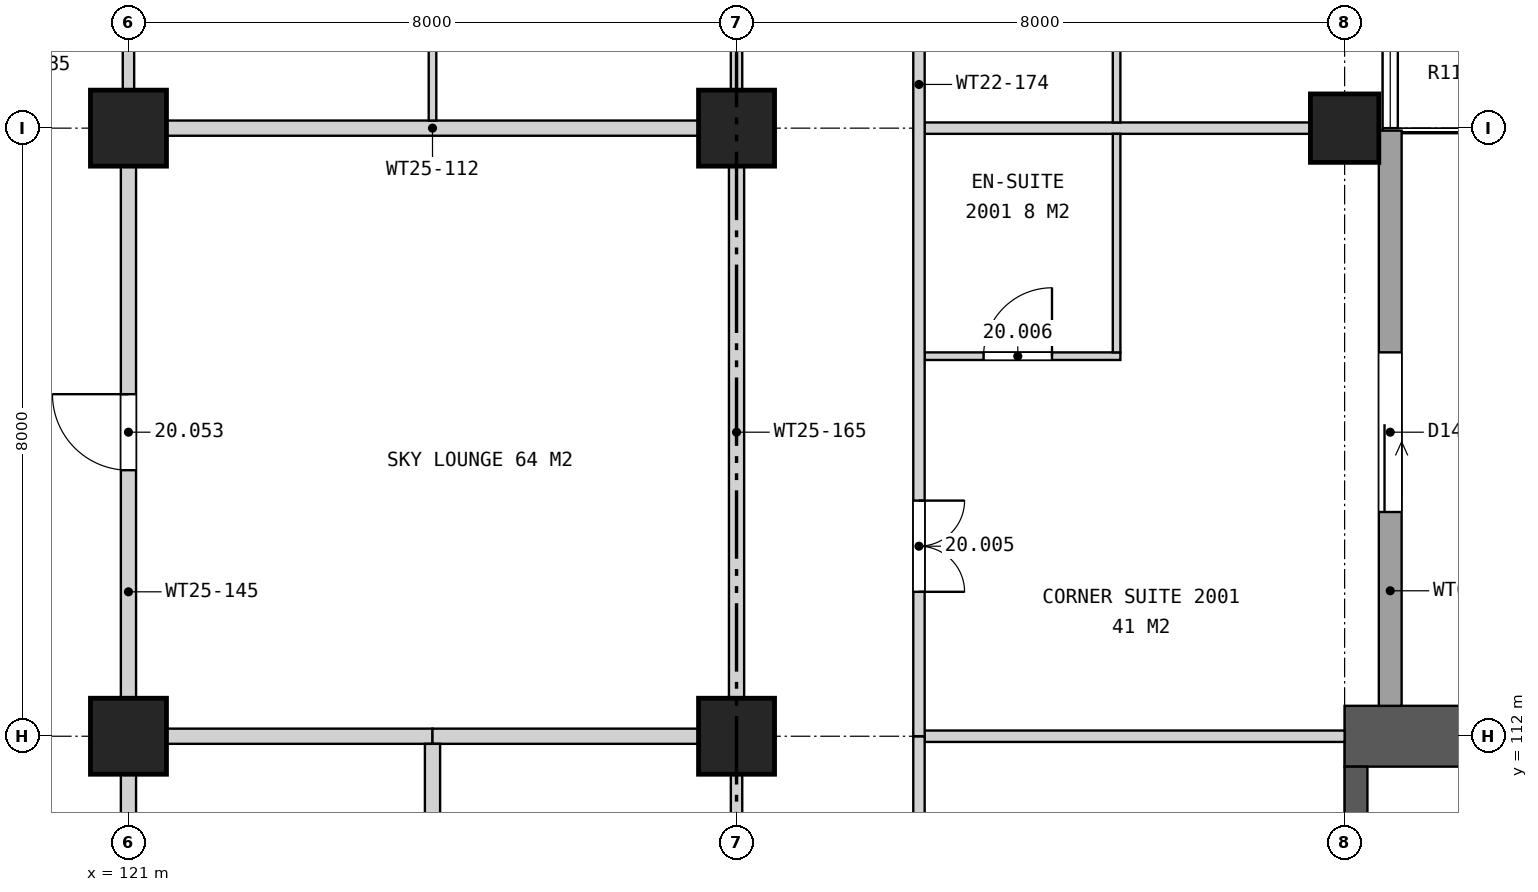
"""IFC4 building model, lengths in metres.
Left out: names, types, materials, properties, quantities, classifications, styles, units other than length and angle.
Written with IfcOpenShell. Run it as: python <this file> out.ifc"""

import sys

from ifc_helpers import new_model, si_unit, direction, frame, frame_2d, origin, origin_2d, place, context, subcontext, project, spatial, rectangle, extrude, element, fill, save


model = new_model("IFC4")
c1 = context("Model", 3, precision=1e-05, world=origin(), true_north=direction((0.0, 1.0)))
c2 = subcontext(c1, "Body", "Model", "MODEL_VIEW")
j1 = project(units=[si_unit("LENGTHUNIT", "METRE"), si_unit("PLANEANGLEUNIT", "RADIAN")], contexts=[c1])
p1 = place(None, origin())
s1 = spatial("IfcSite", under=j1, at=p1, CompositionType="ELEMENT")
p2 = place(p1, origin())
s2 = spatial("IfcBuilding", under=s1, at=p2, CompositionType="ELEMENT")
p3 = place(p2, frame((0.0, 0.0, 101.6)))
s3 = spatial("IfcBuildingStorey", under=s2, at=p3, CompositionType="ELEMENT", Elevation=101.6)
for number, where, z_axis, x_axis in (
    (1, (121.0, 112.0, 0.0), (0.0, 0.0, 1.0), (1.0, 0.0, 0.0)),
    (2, (121.0, 120.0, 0.0), (0.0, 0.0, 1.0), (1.0, 0.0, 0.0)),
    (3, (129.0, 112.0, 0.0), (0.0, 0.0, 1.0), (1.0, 0.0, 0.0)),
    (4, (129.0, 120.0, 0.0), (0.0, 0.0, 1.0), (1.0, 0.0, 0.0)),
):
    element("IfcColumn", number, at=place(p3, frame(where, z_axis=z_axis, x_axis=x_axis)), inside=s3, PredefinedType="COLUMN", context=c2, shape_type="SweptSolid", body=[
        extrude(rectangle(XDim=1.0, YDim=1.0, at=origin_2d()), origin(), (0.0, 0.0, 1.0), 3.7),
    ])
p4 = place(p3, frame((137.0, 120.0, 0.0), z_axis=(0.0, 0.0, 1.0), x_axis=(1.0, 0.0, 0.0)))
e5 = element("IfcColumn", 5, at=p4, inside=s3, PredefinedType="COLUMN", context=c2, shape_type="SweptSolid", body=[
    extrude(rectangle(XDim=0.9, YDim=0.9, at=origin_2d()), origin(), (0.0, 0.0, 1.0), 3.7),
])
p5 = place(p3, frame((137.0, 112.0, 0.0), z_axis=(0.0, 0.0, 1.0), x_axis=(1.0, 0.0, 0.0)))
e6 = element("IfcWall", 6, at=p5, inside=s3, PredefinedType="SHEAR", context=c2, shape_type="SweptSolid", body=[
    extrude(rectangle(XDim=7.1, YDim=0.8, at=frame_2d((3.55, 0.0))), origin(), (0.0, 0.0, 1.0), 3.7),
])
p6 = place(p3, frame((137.15, 105.7, 0.0), z_axis=(0.0, 0.0, 1.0), x_axis=(0.0, 1.0, 0.0)))
e7 = element("IfcWall", 7, at=p6, inside=s3, PredefinedType="SHEAR", context=c2, shape_type="SweptSolid", body=[
    extrude(rectangle(XDim=5.9, YDim=0.3, at=frame_2d((2.95, 0.0))), origin(), (0.0, 0.0, 1.0), 3.7),
])
p7 = place(p3, frame((137.6, 112.4, 0.0), z_axis=(0.0, 0.0, 1.0), x_axis=(0.0, 1.0, 0.0)))
e8 = element("IfcWall", 8, at=p7, inside=s3, PredefinedType="SOLIDWALL", context=c2, shape_type="SweptSolid", body=[
    extrude(rectangle(XDim=7.568, YDim=0.3, at=frame_2d((3.784, 0.0))), origin(), (0.0, 0.0, 1.0), 3.3),
])
p8 = place(p7, frame((2.55, 0.0, 0.0)))
e9 = element("IfcOpeningElement", 9, at=p8, cuts=e8, PredefinedType="OPENING", context=c2, shape_type="SweptSolid", body=[
    extrude(rectangle(XDim=2.1, YDim=2.4, at=frame_2d((1.05, 1.2))), frame((0.0, 0.16, 0.0), z_axis=(0.0, -1.0, 0.0), x_axis=(1.0, 0.0, 0.0)), (0.0, 0.0, 1.0), 0.32),
])
p9 = place(p3, frame((121.5, 112.0, 0.0), z_axis=(0.0, 0.0, 1.0), x_axis=(1.0, 0.0, 0.0)))
e10 = element("IfcWall", 10, at=p9, inside=s3, PredefinedType="SOLIDWALL", context=c2, shape_type="SweptSolid", body=[
    extrude(rectangle(XDim=3.5, YDim=0.2, at=frame_2d((1.75, 0.0))), origin(), (0.0, 0.0, 1.0), 3.7),
])
p10 = place(p3, frame((125.0, 112.0, 0.0), z_axis=(0.0, 0.0, 1.0), x_axis=(1.0, 0.0, 0.0)))
e11 = element("IfcWall", 11, at=p10, inside=s3, PredefinedType="PARTITIONING", context=c2, shape_type="SweptSolid", body=[
    extrude(rectangle(XDim=3.5, YDim=0.2, at=frame_2d((1.75, 0.0))), origin(), (0.0, 0.0, 1.0), 3.7),
])
p11 = place(p3, frame((131.475, 112.0, 0.0), z_axis=(0.0, 0.0, 1.0), x_axis=(1.0, 0.0, 0.0)))
e12 = element("IfcWall", 12, at=p11, inside=s3, PredefinedType="PARTITIONING", context=c2, shape_type="SweptSolid", body=[
    extrude(rectangle(XDim=5.525, YDim=0.15, at=frame_2d((2.762, 0.0))), origin(), (0.0, 0.0, 1.0), 3.7),
])
p12 = place(p3, frame((131.475, 117.0, 0.0), z_axis=(0.0, 0.0, 1.0), x_axis=(1.0, 0.0, 0.0)))
e13 = element("IfcWall", 13, at=p12, inside=s3, PredefinedType="PLUMBINGWALL", context=c2, shape_type="SweptSolid", body=[
    extrude(rectangle(XDim=2.575, YDim=0.1, at=frame_2d((1.288, 0.0))), origin(), (0.0, 0.0, 1.0), 3.7),
])
p13 = place(p12, frame((0.775, 0.0, 0.0)))
e14 = element("IfcOpeningElement", 14, at=p13, cuts=e13, PredefinedType="OPENING", context=c2, shape_type="SweptSolid", body=[
    extrude(rectangle(XDim=0.9, YDim=2.1, at=frame_2d((0.45, 1.05))), frame((0.0, 0.06, 0.0), z_axis=(0.0, -1.0, 0.0), x_axis=(1.0, 0.0, 0.0)), (0.0, 0.0, 1.0), 0.12),
])
p14 = place(p3, frame((121.5, 120.0, 0.0), z_axis=(0.0, 0.0, 1.0), x_axis=(1.0, 0.0, 0.0)))
e15 = element("IfcWall", 15, at=p14, inside=s3, PredefinedType="PARTITIONING", context=c2, shape_type="SweptSolid", body=[
    extrude(rectangle(XDim=7.0, YDim=0.2, at=frame_2d((3.5, 0.0))), origin(), (0.0, 0.0, 1.0), 2.76),
])
p15 = place(p3, frame((131.475, 120.0, 0.0), z_axis=(0.0, 0.0, 1.0), x_axis=(1.0, 0.0, 0.0)))
e16 = element("IfcWall", 16, at=p15, inside=s3, PredefinedType="PARTITIONING", context=c2, shape_type="SweptSolid", body=[
    extrude(rectangle(XDim=5.075, YDim=0.15, at=frame_2d((2.538, 0.0))), origin(), (0.0, 0.0, 1.0), 2.76),
])
p16 = place(p3, frame((121.0, 108.0, 0.0), z_axis=(0.0, 0.0, 1.0), x_axis=(0.0, 1.0, 0.0)))
e17 = element("IfcWall", 17, at=p16, inside=s3, PredefinedType="SOLIDWALL", context=c2, shape_type="SweptSolid", body=[
    extrude(rectangle(XDim=3.5, YDim=0.2, at=frame_2d((1.75, 0.0))), origin(), (0.0, 0.0, 1.0), 2.76),
])
p17 = place(p16, frame((1.5, 0.0, 0.0)))
e18 = element("IfcOpeningElement", 18, at=p17, cuts=e17, PredefinedType="OPENING", context=c2, shape_type="SweptSolid", body=[
    extrude(rectangle(XDim=1.0, YDim=2.2, at=frame_2d((0.5, 1.1))), frame((0.0, 0.11, 0.0), z_axis=(0.0, -1.0, 0.0), x_axis=(1.0, 0.0, 0.0)), (0.0, 0.0, 1.0), 0.22),
])
p18 = place(p3, frame((121.0, 112.5, 0.0), z_axis=(0.0, 0.0, 1.0), x_axis=(0.0, 1.0, 0.0)))
e19 = element("IfcWall", 19, at=p18, inside=s3, PredefinedType="PARTITIONING", context=c2, shape_type="SweptSolid", body=[
    extrude(rectangle(XDim=7.0, YDim=0.2, at=frame_2d((3.5, 0.0))), origin(), (0.0, 0.0, 1.0), 2.76),
])
p19 = place(p18, frame((3.0, 0.0, 0.0)))
e20 = element("IfcOpeningElement", 20, at=p19, cuts=e19, PredefinedType="OPENING", context=c2, shape_type="SweptSolid", body=[
    extrude(rectangle(XDim=1.0, YDim=2.1, at=frame_2d((0.5, 1.05))), frame((0.0, 0.11, 0.0), z_axis=(0.0, -1.0, 0.0), x_axis=(1.0, 0.0, 0.0)), (0.0, 0.0, 1.0), 0.22),
])
p20 = place(p3, frame((121.0, 120.5, 0.0), z_axis=(0.0, 0.0, 1.0), x_axis=(0.0, 1.0, 0.0)))
e21 = element("IfcWall", 21, at=p20, inside=s3, PredefinedType="PARTITIONING", context=c2, shape_type="SweptSolid", body=[
    extrude(rectangle(XDim=7.05, YDim=0.15, at=frame_2d((3.525, 0.0))), origin(), (0.0, 0.0, 1.0), 2.76),
])
p21 = place(p20, frame((3.0, 0.0, 0.0)))
e22 = element("IfcOpeningElement", 22, at=p21, cuts=e21, PredefinedType="OPENING", context=c2, shape_type="SweptSolid", body=[
    extrude(rectangle(XDim=1.0, YDim=2.1, at=frame_2d((0.5, 1.05))), frame((0.0, 0.085, 0.0), z_axis=(0.0, -1.0, 0.0), x_axis=(1.0, 0.0, 0.0)), (0.0, 0.0, 1.0), 0.17),
])
p22 = place(p3, frame((125.0, 108.05, 0.0), z_axis=(0.0, 0.0, 1.0), x_axis=(0.0, 1.0, 0.0)))
e23 = element("IfcWall", 23, at=p22, inside=s3, PredefinedType="SOLIDWALL", context=c2, shape_type="SweptSolid", body=[
    extrude(rectangle(XDim=3.85, YDim=0.2, at=frame_2d((1.925, 0.0))), origin(), (0.0, 0.0, 1.0), 2.843),
])
p23 = place(p3, frame((125.0, 120.1, 0.0), z_axis=(0.0, 0.0, 1.0), x_axis=(0.0, 1.0, 0.0)))
e24 = element("IfcWall", 24, at=p23, inside=s3, PredefinedType="PARTITIONING", context=c2, shape_type="SweptSolid", body=[
    extrude(rectangle(XDim=7.85, YDim=0.1, at=frame_2d((3.925, 0.0))), origin(), (0.0, 0.0, 1.0), 2.76),
])
p24 = place(p3, frame((129.0, 104.5, 0.0), z_axis=(0.0, 0.0, 1.0), x_axis=(0.0, 1.0, 0.0)))
e25 = element("IfcWall", 25, at=p24, inside=s3, PredefinedType="PARTITIONING", context=c2, shape_type="SweptSolid", body=[
    extrude(rectangle(XDim=7.0, YDim=0.15, at=frame_2d((3.5, 0.0))), origin(), (0.0, 0.0, 1.0), 2.76),
])
p25 = place(p24, frame((1.0, 0.0, 0.0)))
e26 = element("IfcOpeningElement", 26, at=p25, cuts=e25, PredefinedType="OPENING", context=c2, shape_type="SweptSolid", body=[
    extrude(rectangle(XDim=1.0, YDim=2.1, at=frame_2d((0.5, 1.05))), frame((0.0, 0.085, 0.0), z_axis=(0.0, -1.0, 0.0), x_axis=(1.0, 0.0, 0.0)), (0.0, 0.0, 1.0), 0.17),
])
p26 = place(p24, frame((5.0, 0.0, 0.0)))
e27 = element("IfcOpeningElement", 27, at=p26, cuts=e25, PredefinedType="OPENING", context=c2, shape_type="SweptSolid", body=[
    extrude(rectangle(XDim=1.0, YDim=2.1, at=frame_2d((0.5, 1.05))), frame((0.0, 0.085, 0.0), z_axis=(0.0, -1.0, 0.0), x_axis=(1.0, 0.0, 0.0)), (0.0, 0.0, 1.0), 0.17),
])
p27 = place(p3, frame((129.0, 112.5, 0.0), z_axis=(0.0, 0.0, 1.0), x_axis=(0.0, 1.0, 0.0)))
e28 = element("IfcWall", 28, at=p27, inside=s3, PredefinedType="PARTITIONING", context=c2, shape_type="SweptSolid", body=[
    extrude(rectangle(XDim=7.0, YDim=0.2, at=frame_2d((3.5, 0.0))), origin(), (0.0, 0.0, 1.0), 2.76),
])
p28 = place(p3, frame((129.0, 120.5, 0.0), z_axis=(0.0, 0.0, 1.0), x_axis=(0.0, 1.0, 0.0)))
e29 = element("IfcWall", 29, at=p28, inside=s3, PredefinedType="PARTITIONING", context=c2, shape_type="SweptSolid", body=[
    extrude(rectangle(XDim=7.05, YDim=0.15, at=frame_2d((3.525, 0.0))), origin(), (0.0, 0.0, 1.0), 2.76),
])
p29 = place(p28, frame((3.0, 0.0, 0.0)))
e30 = element("IfcOpeningElement", 30, at=p29, cuts=e29, PredefinedType="OPENING", context=c2, shape_type="SweptSolid", body=[
    extrude(rectangle(XDim=1.0, YDim=2.1, at=frame_2d((0.5, 1.05))), frame((0.0, 0.085, 0.0), z_axis=(0.0, -1.0, 0.0), x_axis=(1.0, 0.0, 0.0)), (0.0, 0.0, 1.0), 0.17),
])
p30 = place(p3, frame((131.4, 105.775, 0.0), z_axis=(0.0, 0.0, 1.0), x_axis=(0.0, 1.0, 0.0)))
e31 = element("IfcWall", 31, at=p30, inside=s3, PredefinedType="PARTITIONING", context=c2, shape_type="SweptSolid", body=[
    extrude(rectangle(XDim=6.225, YDim=0.15, at=frame_2d((3.113, 0.0))), origin(), (0.0, 0.0, 1.0), 2.843),
])
p31 = place(p30, frame((2.575, 0.0, 0.0)))
e32 = element("IfcOpeningElement", 32, at=p31, cuts=e31, PredefinedType="OPENING", context=c2, shape_type="SweptSolid", body=[
    extrude(rectangle(XDim=1.0, YDim=2.1, at=frame_2d((0.5, 1.05))), frame((0.0, 0.085, 0.0), z_axis=(0.0, -1.0, 0.0), x_axis=(1.0, 0.0, 0.0)), (0.0, 0.0, 1.0), 0.17),
])
p32 = place(p3, frame((131.4, 112.0, 0.0), z_axis=(0.0, 0.0, 1.0), x_axis=(0.0, 1.0, 0.0)))
e33 = element("IfcWall", 33, at=p32, inside=s3, PredefinedType="PARTITIONING", context=c2, shape_type="SweptSolid", body=[
    extrude(rectangle(XDim=24.5, YDim=0.15, at=frame_2d((12.25, 0.0))), origin(), (0.0, 0.0, 1.0), 2.76),
])
p33 = place(p32, frame((1.9, 0.0, 0.0)))
e34 = element("IfcOpeningElement", 34, at=p33, cuts=e33, PredefinedType="OPENING", context=c2, shape_type="SweptSolid", body=[
    extrude(rectangle(XDim=1.2, YDim=2.2, at=frame_2d((0.6, 1.1))), frame((0.0, 0.085, 0.0), z_axis=(0.0, -1.0, 0.0), x_axis=(1.0, 0.0, 0.0)), (0.0, 0.0, 1.0), 0.17),
])
p34 = place(p32, frame((12.9, 0.0, 0.0)))
e35 = element("IfcOpeningElement", 35, at=p34, cuts=e33, PredefinedType="OPENING", context=c2, shape_type="SweptSolid", body=[
    extrude(rectangle(XDim=1.2, YDim=2.2, at=frame_2d((0.6, 1.1))), frame((0.0, 0.085, 0.0), z_axis=(0.0, -1.0, 0.0), x_axis=(1.0, 0.0, 0.0)), (0.0, 0.0, 1.0), 0.17),
])
p35 = place(p32, frame((17.9, 0.0, 0.0)))
e36 = element("IfcOpeningElement", 36, at=p35, cuts=e33, PredefinedType="OPENING", context=c2, shape_type="SweptSolid", body=[
    extrude(rectangle(XDim=1.2, YDim=2.2, at=frame_2d((0.6, 1.1))), frame((0.0, 0.085, 0.0), z_axis=(0.0, -1.0, 0.0), x_axis=(1.0, 0.0, 0.0)), (0.0, 0.0, 1.0), 0.17),
])
for number, where, z_axis, x_axis in (
    (37, (134.0, 117.05, 0.0), (0.0, 0.0, 1.0), (0.0, 1.0, 0.0)),
    (38, (134.0, 120.075, 0.0), (0.0, 0.0, 1.0), (0.0, 1.0, 0.0)),
):
    element("IfcWall", number, at=place(p3, frame(where, z_axis=z_axis, x_axis=x_axis)), inside=s3, PredefinedType="PLUMBINGWALL", context=c2, shape_type="SweptSolid", body=[
        extrude(rectangle(XDim=2.875, YDim=0.1, at=frame_2d((1.438, 0.0))), origin(), (0.0, 0.0, 1.0), 3.7),
    ])
p36 = place(p8, frame((2.1, 0.0, 0.0), z_axis=(0.0, 0.0, 1.0), x_axis=(-1.0, 0.0, 0.0)))
e39 = element("IfcDoor", 39, at=p36, inside=s3, OperationType="SLIDING_TO_LEFT", PredefinedType="DOOR", context=c2, shape_type="SweptSolid", body=[
    extrude(rectangle(XDim=2.1, YDim=2.4, at=frame_2d((1.05, 1.2))), frame((0.0, 0.025, 0.0), z_axis=(0.0, -1.0, 0.0), x_axis=(1.0, 0.0, 0.0)), (0.0, 0.0, 1.0), 0.05),
])
fill(e9, e39)
p37 = place(p33, frame((1.2, 0.0, 0.0), z_axis=(0.0, 0.0, 1.0), x_axis=(-1.0, 0.0, 0.0)))
e40 = element("IfcDoor", 40, at=p37, inside=s3, OperationType="DOUBLE_DOOR_SINGLE_SWING", PredefinedType="DOOR", context=c2, shape_type="SweptSolid", body=[
    extrude(rectangle(XDim=1.2, YDim=2.2, at=frame_2d((0.6, 1.1))), frame((0.0, 0.025, 0.0), z_axis=(0.0, -1.0, 0.0), x_axis=(1.0, 0.0, 0.0)), (0.0, 0.0, 1.0), 0.05),
])
fill(e34, e40)
p38 = place(p13, origin())
e41 = element("IfcDoor", 41, at=p38, inside=s3, OperationType="SINGLE_SWING_RIGHT", PredefinedType="DOOR", context=c2, shape_type="SweptSolid", body=[
    extrude(rectangle(XDim=0.9, YDim=2.1, at=frame_2d((0.45, 1.05))), frame((0.0, 0.025, 0.0), z_axis=(0.0, -1.0, 0.0), x_axis=(1.0, 0.0, 0.0)), (0.0, 0.0, 1.0), 0.05),
])
fill(e14, e41)
p39 = place(p19, origin())
e42 = element("IfcDoor", 42, at=p39, inside=s3, OperationType="SINGLE_SWING_RIGHT", PredefinedType="DOOR", context=c2, shape_type="SweptSolid", body=[
    extrude(rectangle(XDim=1.0, YDim=2.1, at=frame_2d((0.5, 1.05))), frame((0.0, 0.025, 0.0), z_axis=(0.0, -1.0, 0.0), x_axis=(1.0, 0.0, 0.0)), (0.0, 0.0, 1.0), 0.05),
])
fill(e20, e42)
save(model, sys.argv[1])
